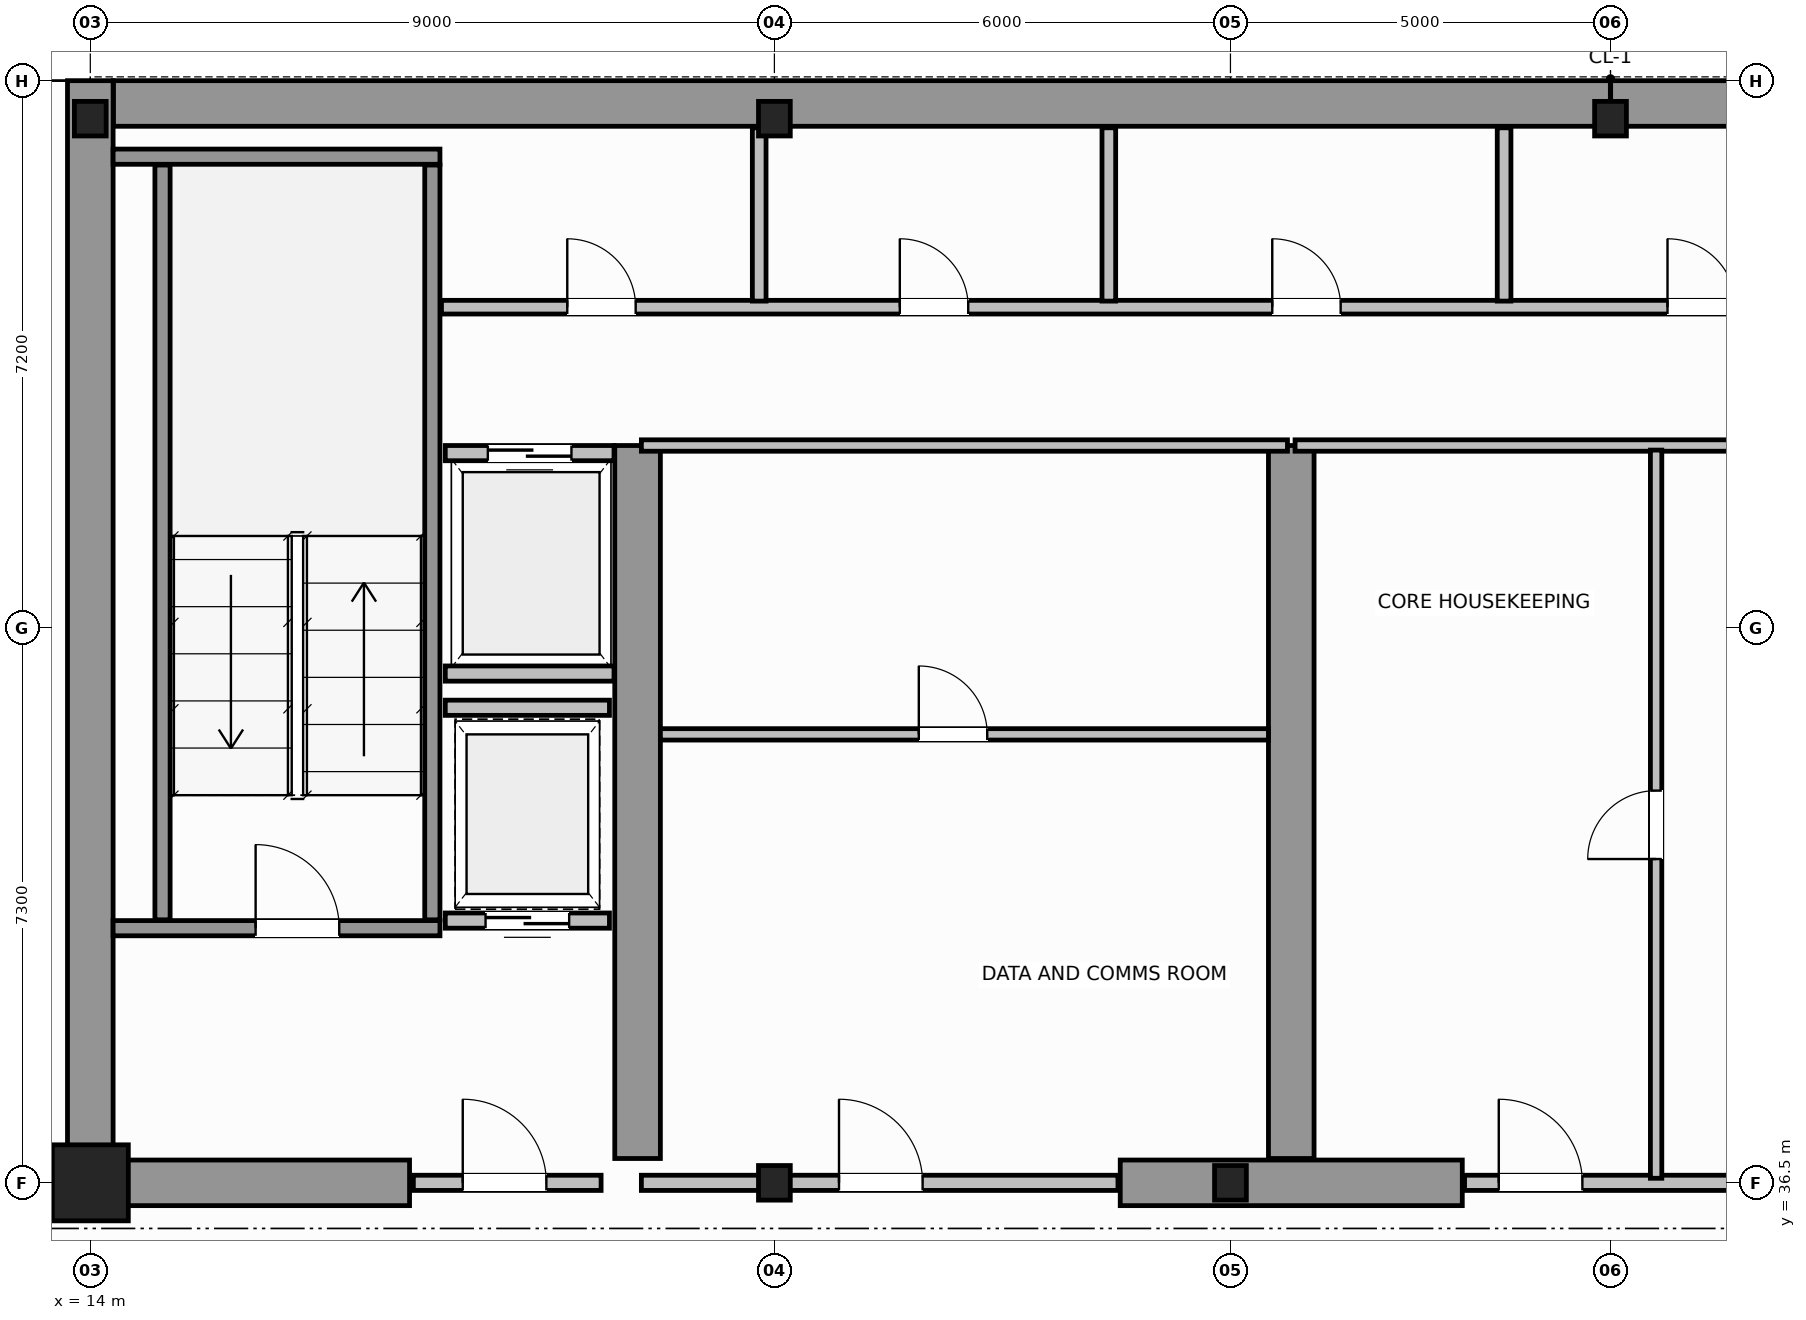
"""IFC4 building model, lengths in metres.
Left out: names, types, materials, properties, quantities, classifications, styles, units other than length and angle.
Written with IfcOpenShell. Run it as: python <this file> out.ifc"""

import sys

from ifc_helpers import new_model, si_unit, direction, frame, frame_2d, origin, origin_2d, place, context, subcontext, project, spatial, rectangle, i_section, extrude, source, transform, mapped, element, fill, save


model = new_model("IFC4")
c1 = context("Model", 3, precision=1e-05, world=origin(), true_north=direction((0.0, 1.0)))
c2 = subcontext(c1, "Body", "Model", "MODEL_VIEW")
j1 = project(units=[si_unit("LENGTHUNIT", "METRE"), si_unit("PLANEANGLEUNIT", "RADIAN")], contexts=[c1])
p1 = place(None, origin())
s1 = spatial("IfcSite", under=j1, at=p1, CompositionType="ELEMENT")
p2 = place(p1, origin())
s2 = spatial("IfcBuilding", under=s1, at=p2, CompositionType="ELEMENT")
p3 = place(p2, frame((0.0, 0.0, 234.6)))
s3 = spatial("IfcBuildingStorey", under=s2, at=p3, CompositionType="ELEMENT", Elevation=234.6)
m1 = source(origin(), c2, "Body", "SweptSolid", [
    extrude(rectangle(XDim=1.0, YDim=1.0, at=origin_2d()), origin(), (0.0, 0.0, 1.0), 3.8),
])
p4 = place(p3, frame((14.0, 36.5, 0.0), z_axis=(0.0, 0.0, 1.0), x_axis=(1.0, 0.0, 0.0)))
e1 = element("IfcColumn", 1, at=p4, inside=s3, PredefinedType="COLUMN", context=c2, shape_type="MappedRepresentation", body=[
    mapped(m1, transform((0.0, 0.0, 0.0), scale=1.0)),
])
m2 = source(origin(), c2, "Body", "SweptSolid", [
    extrude(i_section(OverallWidth=0.418, OverallDepth=0.455, WebThickness=0.042, FlangeThickness=0.058, FilletRadius=0.015, at=origin_2d()), origin(), (0.0, 0.0, 1.0), 3.8),
])
for number, where, z_axis, x_axis in (
    (2, (23.0, 36.5, 0.0), (0.0, 0.0, 1.0), (1.0, 0.0, 0.0)),
    (3, (29.0, 36.5, 0.0), (0.0, 0.0, 1.0), (1.0, 0.0, 0.0)),
    (4, (14.0, 50.5, 0.0), (0.0, 0.0, 1.0), (1.0, 0.0, 0.0)),
    (5, (23.0, 50.5, 0.0), (0.0, 0.0, 1.0), (1.0, 0.0, 0.0)),
    (6, (34.0, 50.5, 0.0), (0.0, 0.0, 1.0), (1.0, 0.0, 0.0)),
):
    element("IfcColumn", number, at=place(p3, frame(where, z_axis=z_axis, x_axis=x_axis)), inside=s3, PredefinedType="COLUMN", context=c2, shape_type="MappedRepresentation", body=[
        mapped(m2, transform((0.0, 0.0, 0.0), scale=1.0)),
    ])
for number, where, z_axis, x_axis in (
    (7, (14.304, 50.7, 0.0), (0.0, 0.0, 1.0), (1.0, 0.0, 0.0)),
    (8, (34.002, 50.7, 0.0), (0.0, 0.0, 1.0), (1.0, 0.0, 0.0)),
):
    element("IfcWall", number, at=place(p3, frame(where, z_axis=z_axis, x_axis=x_axis)), inside=s3, PredefinedType="SHEAR", context=c2, shape_type="SweptSolid", body=[
        extrude(rectangle(XDim=19.694, YDim=0.6, at=frame_2d((9.847, 0.0))), origin(), (0.0, 0.0, 1.0), 3.8),
    ])
p5 = place(p3, frame((14.0, 36.5, 0.0), z_axis=(0.0, 0.0, 1.0), x_axis=(0.0, 1.0, 0.0)))
e9 = element("IfcWall", 9, at=p5, inside=s3, PredefinedType="SHEAR", context=c2, shape_type="SweptSolid", body=[
    extrude(rectangle(XDim=14.5, YDim=0.6, at=frame_2d((7.25, 0.0))), origin(), (0.0, 0.0, 1.0), 3.8),
])
p6 = place(p3, frame((14.32, 36.5, 0.0), z_axis=(0.0, 0.0, 1.0), x_axis=(1.0, 0.0, 0.0)))
e10 = element("IfcWall", 10, at=p6, inside=s3, PredefinedType="SHEAR", context=c2, shape_type="SweptSolid", body=[
    extrude(rectangle(XDim=3.88, YDim=0.6, at=frame_2d((1.94, 0.0))), origin(), (0.0, 0.0, 1.0), 2.58),
])
p7 = place(p3, frame((27.55, 36.5, 0.0), z_axis=(0.0, 0.0, 1.0), x_axis=(1.0, 0.0, 0.0)))
e11 = element("IfcWall", 11, at=p7, inside=s3, PredefinedType="SHEAR", context=c2, shape_type="SweptSolid", body=[
    extrude(rectangle(XDim=4.5, YDim=0.6, at=frame_2d((2.25, 0.0))), origin(), (0.0, 0.0, 1.0), 3.8),
])
for number, where, z_axis, x_axis in (
    (12, (21.2, 36.82, 0.0), (0.0, 0.0, 1.0), (0.0, 1.0, 0.0)),
    (13, (29.8, 36.82, 0.0), (0.0, 0.0, 1.0), (0.0, 1.0, 0.0)),
):
    element("IfcWall", number, at=place(p3, frame(where, z_axis=z_axis, x_axis=x_axis)), inside=s3, PredefinedType="SHEAR", context=c2, shape_type="SweptSolid", body=[
        extrude(rectangle(XDim=9.38, YDim=0.6, at=frame_2d((4.69, 0.0))), origin(), (0.0, 0.0, 1.0), 3.8),
    ])
p8 = place(p3, frame((14.3, 39.85, 0.0), z_axis=(0.0, 0.0, 1.0), x_axis=(1.0, 0.0, 0.0)))
e14 = element("IfcWall", 14, at=p8, inside=s3, PredefinedType="SOLIDWALL", context=c2, shape_type="SweptSolid", body=[
    extrude(rectangle(XDim=4.3, YDim=0.2, at=frame_2d((2.15, 0.0))), origin(), (0.0, 0.0, 1.0), 3.8),
])
p9 = place(p8, frame((1.875, 0.0, 0.0)))
e15 = element("IfcOpeningElement", 15, at=p9, cuts=e14, PredefinedType="OPENING", context=c2, shape_type="SweptSolid", body=[
    extrude(rectangle(XDim=1.1, YDim=2.15, at=frame_2d((0.55, 1.075))), frame((0.0, 0.11, 0.0), z_axis=(0.0, -1.0, 0.0), x_axis=(1.0, 0.0, 0.0)), (0.0, 0.0, 1.0), 0.22),
])
p10 = place(p3, frame((14.3, 50.0, 0.0), z_axis=(0.0, 0.0, 1.0), x_axis=(1.0, 0.0, 0.0)))
e16 = element("IfcWall", 16, at=p10, inside=s3, PredefinedType="SOLIDWALL", context=c2, shape_type="SweptSolid", body=[
    extrude(rectangle(XDim=4.3, YDim=0.2, at=frame_2d((2.15, 0.0))), origin(), (0.0, 0.0, 1.0), 3.8),
])
for number, where, z_axis, x_axis in (
    (17, (14.95, 39.96, 0.0), (0.0, 0.0, 1.0), (0.0, 1.0, 0.0)),
    (18, (18.5, 39.96, 0.0), (0.0, 0.0, 1.0), (0.0, 1.0, 0.0)),
):
    element("IfcWall", number, at=place(p3, frame(where, z_axis=z_axis, x_axis=x_axis)), inside=s3, PredefinedType="SOLIDWALL", context=c2, shape_type="SweptSolid", body=[
        extrude(rectangle(XDim=9.93, YDim=0.2, at=frame_2d((4.965, 0.0))), origin(), (0.0, 0.0, 1.0), 3.8),
    ])
p11 = place(p3, frame((18.25, 36.5, 0.0), z_axis=(0.0, 0.0, 1.0), x_axis=(1.0, 0.0, 0.0)))
e19 = element("IfcWall", 19, at=p11, inside=s3, PredefinedType="SOLIDWALL", context=c2, shape_type="SweptSolid", body=[
    extrude(rectangle(XDim=2.47, YDim=0.2, at=frame_2d((1.235, 0.0))), origin(), (0.0, 0.0, 1.0), 2.57),
])
p12 = place(p11, frame((0.65, 0.0, 0.0)))
e20 = element("IfcOpeningElement", 20, at=p12, cuts=e19, PredefinedType="OPENING", context=c2, shape_type="SweptSolid", body=[
    extrude(rectangle(XDim=1.1, YDim=2.15, at=frame_2d((0.55, 1.075))), frame((0.0, 0.11, 0.0), z_axis=(0.0, -1.0, 0.0), x_axis=(1.0, 0.0, 0.0)), (0.0, 0.0, 1.0), 0.22),
])
p13 = place(p3, frame((18.67, 46.1, 0.0), z_axis=(0.0, 0.0, 1.0), x_axis=(1.0, 0.0, 0.0)))
e21 = element("IfcWall", 21, at=p13, inside=s3, PredefinedType="SOLIDWALL", context=c2, shape_type="SweptSolid", body=[
    extrude(rectangle(XDim=2.22, YDim=0.2, at=frame_2d((1.11, 0.0))), origin(), (0.0, 0.0, 1.0), 3.58),
])
p14 = place(p13, frame((0.56, 0.0, 0.0)))
e22 = element("IfcOpeningElement", 22, at=p14, cuts=e21, PredefinedType="OPENING", context=c2, shape_type="SweptSolid", body=[
    extrude(rectangle(XDim=1.1, YDim=2.15, at=frame_2d((0.55, 1.075))), frame((0.0, 0.11, 0.0), z_axis=(0.0, -1.0, 0.0), x_axis=(1.0, 0.0, 0.0)), (0.0, 0.0, 1.0), 0.22),
])
p15 = place(p3, frame((18.67, 43.2, 0.0), z_axis=(0.0, 0.0, 1.0), x_axis=(1.0, 0.0, 0.0)))
e23 = element("IfcWall", 23, at=p15, inside=s3, PredefinedType="SOLIDWALL", context=c2, shape_type="SweptSolid", body=[
    extrude(rectangle(XDim=2.22, YDim=0.2, at=frame_2d((1.11, 0.0))), origin(), (0.0, 0.0, 1.0), 3.58),
])
p16 = place(p3, frame((18.67, 39.95, 0.0), z_axis=(0.0, 0.0, 1.0), x_axis=(1.0, 0.0, 0.0)))
e24 = element("IfcWall", 24, at=p16, inside=s3, PredefinedType="SOLIDWALL", context=c2, shape_type="SweptSolid", body=[
    extrude(rectangle(XDim=2.16, YDim=0.2, at=frame_2d((1.08, 0.0))), origin(), (0.0, 0.0, 1.0), 3.58),
])
p17 = place(p16, frame((0.53, 0.0, 0.0)))
e25 = element("IfcOpeningElement", 25, at=p17, cuts=e24, PredefinedType="OPENING", context=c2, shape_type="SweptSolid", body=[
    extrude(rectangle(XDim=1.1, YDim=2.15, at=frame_2d((0.55, 1.075))), frame((0.0, 0.11, 0.0), z_axis=(0.0, -1.0, 0.0), x_axis=(1.0, 0.0, 0.0)), (0.0, 0.0, 1.0), 0.22),
])
p18 = place(p3, frame((18.67, 42.75, 0.0), z_axis=(0.0, 0.0, 1.0), x_axis=(1.0, 0.0, 0.0)))
e26 = element("IfcWall", 26, at=p18, inside=s3, PredefinedType="SOLIDWALL", context=c2, shape_type="SweptSolid", body=[
    extrude(rectangle(XDim=2.16, YDim=0.2, at=frame_2d((1.08, 0.0))), origin(), (0.0, 0.0, 1.0), 3.58),
])
p19 = place(p3, frame((21.25, 36.5, 0.0), z_axis=(0.0, 0.0, 1.0), x_axis=(1.0, 0.0, 0.0)))
e27 = element("IfcWall", 27, at=p19, inside=s3, PredefinedType="SOLIDWALL", context=c2, shape_type="SweptSolid", body=[
    extrude(rectangle(XDim=6.27, YDim=0.2, at=frame_2d((3.135, 0.0))), origin(), (0.0, 0.0, 1.0), 2.37),
])
p20 = place(p19, frame((2.6, 0.0, 0.0)))
e28 = element("IfcOpeningElement", 28, at=p20, cuts=e27, PredefinedType="OPENING", context=c2, shape_type="SweptSolid", body=[
    extrude(rectangle(XDim=1.1, YDim=2.15, at=frame_2d((0.55, 1.075))), frame((0.0, 0.11, 0.0), z_axis=(0.0, -1.0, 0.0), x_axis=(1.0, 0.0, 0.0)), (0.0, 0.0, 1.0), 0.22),
])
p21 = place(p3, frame((21.25, 46.2, 0.0), z_axis=(0.0, 0.0, 1.0), x_axis=(1.0, 0.0, 0.0)))
e29 = element("IfcWall", 29, at=p21, inside=s3, PredefinedType="PARTITIONING", context=c2, shape_type="SweptSolid", body=[
    extrude(rectangle(XDim=8.5, YDim=0.15, at=frame_2d((4.25, 0.0))), origin(), (0.0, 0.0, 1.0), 3.58),
])
p22 = place(p3, frame((21.5, 42.4, 0.0), z_axis=(0.0, 0.0, 1.0), x_axis=(1.0, 0.0, 0.0)))
e30 = element("IfcWall", 30, at=p22, inside=s3, PredefinedType="PARTITIONING", context=c2, shape_type="SweptSolid", body=[
    extrude(rectangle(XDim=8.0, YDim=0.15, at=frame_2d((4.0, 0.0))), origin(), (0.0, 0.0, 1.0), 3.58),
])
p23 = place(p22, frame((3.4, 0.0, 0.0)))
e31 = element("IfcOpeningElement", 31, at=p23, cuts=e30, PredefinedType="OPENING", context=c2, shape_type="SweptSolid", body=[
    extrude(rectangle(XDim=0.9, YDim=2.1, at=frame_2d((0.45, 1.05))), frame((0.0, 0.085, 0.0), z_axis=(0.0, -1.0, 0.0), x_axis=(1.0, 0.0, 0.0)), (0.0, 0.0, 1.0), 0.17),
])
p24 = place(p3, frame((32.08, 36.5, 0.0), z_axis=(0.0, 0.0, 1.0), x_axis=(1.0, 0.0, 0.0)))
e32 = element("IfcWall", 32, at=p24, inside=s3, PredefinedType="SOLIDWALL", context=c2, shape_type="SweptSolid", body=[
    extrude(rectangle(XDim=4.04, YDim=0.2, at=frame_2d((2.02, 0.0))), origin(), (0.0, 0.0, 1.0), 2.37),
])
p25 = place(p24, frame((0.45, 0.0, 0.0)))
e33 = element("IfcOpeningElement", 33, at=p25, cuts=e32, PredefinedType="OPENING", context=c2, shape_type="SweptSolid", body=[
    extrude(rectangle(XDim=1.1, YDim=2.15, at=frame_2d((0.55, 1.075))), frame((0.0, 0.11, 0.0), z_axis=(0.0, -1.0, 0.0), x_axis=(1.0, 0.0, 0.0)), (0.0, 0.0, 1.0), 0.22),
])
p26 = place(p3, frame((29.85, 46.2, 0.0), z_axis=(0.0, 0.0, 1.0), x_axis=(1.0, 0.0, 0.0)))
e34 = element("IfcWall", 34, at=p26, inside=s3, PredefinedType="PARTITIONING", context=c2, shape_type="SweptSolid", body=[
    extrude(rectangle(XDim=8.5, YDim=0.15, at=frame_2d((4.25, 0.0))), origin(), (0.0, 0.0, 1.0), 3.58),
])
p27 = place(p3, frame((34.6, 36.56, 0.0), z_axis=(0.0, 0.0, 1.0), x_axis=(0.0, 1.0, 0.0)))
e35 = element("IfcWall", 35, at=p27, inside=s3, PredefinedType="PARTITIONING", context=c2, shape_type="SweptSolid", body=[
    extrude(rectangle(XDim=9.58, YDim=0.15, at=frame_2d((4.79, 0.0))), origin(), (0.0, 0.0, 1.0), 3.58),
])
p28 = place(p27, frame((4.2, 0.0, 0.0)))
e36 = element("IfcOpeningElement", 36, at=p28, cuts=e35, PredefinedType="OPENING", context=c2, shape_type="SweptSolid", body=[
    extrude(rectangle(XDim=0.9, YDim=2.1, at=frame_2d((0.45, 1.05))), frame((0.0, 0.085, 0.0), z_axis=(0.0, -1.0, 0.0), x_axis=(1.0, 0.0, 0.0)), (0.0, 0.0, 1.0), 0.17),
])
p29 = place(p3, frame((18.62, 48.02, 0.0), z_axis=(0.0, 0.0, 1.0), x_axis=(1.0, 0.0, 0.0)))
e37 = element("IfcWall", 37, at=p29, inside=s3, PredefinedType="PLUMBINGWALL", context=c2, shape_type="SweptSolid", body=[
    extrude(rectangle(XDim=30.76, YDim=0.18, at=frame_2d((15.38, 0.0))), origin(), (0.0, 0.0, 1.0), 3.58),
])
p30 = place(p29, frame((1.655, 0.0, 0.0)))
e38 = element("IfcOpeningElement", 38, at=p30, cuts=e37, PredefinedType="OPENING", context=c2, shape_type="SweptSolid", body=[
    extrude(rectangle(XDim=0.9, YDim=2.15, at=frame_2d((0.45, 1.075))), frame((0.0, 0.1, 0.0), z_axis=(0.0, -1.0, 0.0), x_axis=(1.0, 0.0, 0.0)), (0.0, 0.0, 1.0), 0.2),
])
p31 = place(p29, frame((6.03, 0.0, 0.0)))
e39 = element("IfcOpeningElement", 39, at=p31, cuts=e37, PredefinedType="OPENING", context=c2, shape_type="SweptSolid", body=[
    extrude(rectangle(XDim=0.9, YDim=2.15, at=frame_2d((0.45, 1.075))), frame((0.0, 0.1, 0.0), z_axis=(0.0, -1.0, 0.0), x_axis=(1.0, 0.0, 0.0)), (0.0, 0.0, 1.0), 0.2),
])
p32 = place(p29, frame((10.93, 0.0, 0.0)))
e40 = element("IfcOpeningElement", 40, at=p32, cuts=e37, PredefinedType="OPENING", context=c2, shape_type="SweptSolid", body=[
    extrude(rectangle(XDim=0.9, YDim=2.15, at=frame_2d((0.45, 1.075))), frame((0.0, 0.1, 0.0), z_axis=(0.0, -1.0, 0.0), x_axis=(1.0, 0.0, 0.0)), (0.0, 0.0, 1.0), 0.2),
])
p33 = place(p29, frame((16.13, 0.0, 0.0)))
e41 = element("IfcOpeningElement", 41, at=p33, cuts=e37, PredefinedType="OPENING", context=c2, shape_type="SweptSolid", body=[
    extrude(rectangle(XDim=0.9, YDim=2.15, at=frame_2d((0.45, 1.075))), frame((0.0, 0.1, 0.0), z_axis=(0.0, -1.0, 0.0), x_axis=(1.0, 0.0, 0.0)), (0.0, 0.0, 1.0), 0.2),
])
p34 = place(p29, frame((21.73, 0.0, 0.0)))
e42 = element("IfcOpeningElement", 42, at=p34, cuts=e37, PredefinedType="OPENING", context=c2, shape_type="SweptSolid", body=[
    extrude(rectangle(XDim=0.9, YDim=2.15, at=frame_2d((0.45, 1.075))), frame((0.0, 0.1, 0.0), z_axis=(0.0, -1.0, 0.0), x_axis=(1.0, 0.0, 0.0)), (0.0, 0.0, 1.0), 0.2),
])
p35 = place(p29, frame((27.505, 0.0, 0.0)))
e43 = element("IfcOpeningElement", 43, at=p35, cuts=e37, PredefinedType="OPENING", context=c2, shape_type="SweptSolid", body=[
    extrude(rectangle(XDim=0.9, YDim=2.15, at=frame_2d((0.45, 1.075))), frame((0.0, 0.1, 0.0), z_axis=(0.0, -1.0, 0.0), x_axis=(1.0, 0.0, 0.0)), (0.0, 0.0, 1.0), 0.2),
])
p36 = place(p3, frame((22.8, 48.1, 0.0), z_axis=(0.0, 0.0, 1.0), x_axis=(0.0, 1.0, 0.0)))
e44 = element("IfcWall", 44, at=p36, inside=s3, PredefinedType="PLUMBINGWALL", context=c2, shape_type="SweptSolid", body=[
    extrude(rectangle(XDim=2.28, YDim=0.18, at=frame_2d((1.14, 0.0))), origin(), (0.0, 0.0, 1.0), 2.37),
])
for number, where, z_axis, x_axis in (
    (45, (27.4, 48.1, 0.0), (0.0, 0.0, 1.0), (0.0, 1.0, 0.0)),
    (46, (32.6, 48.1, 0.0), (0.0, 0.0, 1.0), (0.0, 1.0, 0.0)),
):
    element("IfcWall", number, at=place(p3, frame(where, z_axis=z_axis, x_axis=x_axis)), inside=s3, PredefinedType="PLUMBINGWALL", context=c2, shape_type="SweptSolid", body=[
        extrude(rectangle(XDim=2.28, YDim=0.18, at=frame_2d((1.14, 0.0))), origin(), (0.0, 0.0, 1.0), 3.58),
    ])
p37 = place(p3, frame((7.306, 36.48, 0.0), z_axis=(0.0, 0.0, 1.0), x_axis=(1.0, 0.0, 0.0)))
e47 = element("IfcWall", 47, at=p37, inside=s3, PredefinedType="PARTITIONING", context=c2, shape_type="SweptSolid", body=[
    extrude(rectangle(XDim=6.634, YDim=0.12, at=frame_2d((3.317, 0.0))), origin(), (0.0, 0.0, 1.0), 2.37),
])
p38 = place(p37, frame((2.867, 0.0, 0.0)))
e48 = element("IfcOpeningElement", 48, at=p38, cuts=e47, PredefinedType="OPENING", context=c2, shape_type="SweptSolid", body=[
    extrude(rectangle(XDim=0.9, YDim=2.15, at=frame_2d((0.45, 1.075))), frame((0.0, 0.07, 0.0), z_axis=(0.0, -1.0, 0.0), x_axis=(1.0, 0.0, 0.0)), (0.0, 0.0, 1.0), 0.14),
])
m3 = source(origin(), c2, "Body", "SweptSolid", [
    extrude(rectangle(XDim=1.1, YDim=2.15, at=frame_2d((0.55, 1.075))), frame((0.0, 0.025, 0.0), z_axis=(0.0, -1.0, 0.0), x_axis=(1.0, 0.0, 0.0)), (0.0, 0.0, 1.0), 0.05),
])
p39 = place(p9, origin())
e49 = element("IfcDoor", 49, at=p39, inside=s3, OperationType="SINGLE_SWING_LEFT", PredefinedType="DOOR", context=c2, shape_type="MappedRepresentation", body=[
    mapped(m3, transform((0.0, 0.0, 0.0), scale=1.0)),
])
fill(e15, e49)
p40 = place(p12, origin())
e50 = element("IfcDoor", 50, at=p40, inside=s3, OperationType="SINGLE_SWING_RIGHT", PredefinedType="DOOR", context=c2, shape_type="MappedRepresentation", body=[
    mapped(m3, transform((0.0, 0.0, 0.0), scale=1.0)),
])
fill(e20, e50)
p41 = place(p14, origin())
e51 = element("IfcDoor", 51, at=p41, inside=s3, OperationType="DOUBLE_DOOR_SLIDING", PredefinedType="DOOR", context=c2, shape_type="MappedRepresentation", body=[
    mapped(m3, transform((0.0, 0.0, 0.0), scale=1.0)),
])
fill(e22, e51)
p42 = place(p17, origin())
e52 = element("IfcDoor", 52, at=p42, inside=s3, OperationType="DOUBLE_DOOR_SLIDING", PredefinedType="DOOR", context=c2, shape_type="MappedRepresentation", body=[
    mapped(m3, transform((0.0, 0.0, 0.0), scale=1.0)),
])
fill(e25, e52)
p43 = place(p20, origin())
e53 = element("IfcDoor", 53, at=p43, inside=s3, OperationType="SINGLE_SWING_LEFT", PredefinedType="DOOR", context=c2, shape_type="MappedRepresentation", body=[
    mapped(m3, transform((0.0, 0.0, 0.0), scale=1.0)),
])
fill(e28, e53)
m4 = source(origin(), c2, "Body", "SweptSolid", [
    extrude(rectangle(XDim=0.9, YDim=2.1, at=frame_2d((0.45, 1.05))), frame((0.0, 0.025, 0.0), z_axis=(0.0, -1.0, 0.0), x_axis=(1.0, 0.0, 0.0)), (0.0, 0.0, 1.0), 0.05),
])
p44 = place(p23, origin())
e54 = element("IfcDoor", 54, at=p44, inside=s3, OperationType="SINGLE_SWING_RIGHT", PredefinedType="DOOR", context=c2, shape_type="MappedRepresentation", body=[
    mapped(m4, transform((0.0, 0.0, 0.0), scale=1.0)),
])
fill(e31, e54)
p45 = place(p25, origin())
e55 = element("IfcDoor", 55, at=p45, inside=s3, OperationType="SINGLE_SWING_LEFT", PredefinedType="DOOR", context=c2, shape_type="MappedRepresentation", body=[
    mapped(m3, transform((0.0, 0.0, 0.0), scale=1.0)),
])
fill(e33, e55)
p46 = place(p28, origin())
e56 = element("IfcDoor", 56, at=p46, inside=s3, OperationType="SINGLE_SWING_RIGHT", PredefinedType="DOOR", context=c2, shape_type="MappedRepresentation", body=[
    mapped(m4, transform((0.0, 0.0, 0.0), scale=1.0)),
])
fill(e36, e56)
m5 = source(origin(), c2, "Body", "SweptSolid", [
    extrude(rectangle(XDim=0.9, YDim=2.15, at=frame_2d((0.45, 1.075))), frame((0.0, 0.025, 0.0), z_axis=(0.0, -1.0, 0.0), x_axis=(1.0, 0.0, 0.0)), (0.0, 0.0, 1.0), 0.05),
])
p47 = place(p30, origin())
e57 = element("IfcDoor", 57, at=p47, inside=s3, OperationType="SINGLE_SWING_LEFT", PredefinedType="DOOR", context=c2, shape_type="MappedRepresentation", body=[
    mapped(m5, transform((0.0, 0.0, 0.0), scale=1.0)),
])
fill(e38, e57)
p48 = place(p31, origin())
e58 = element("IfcDoor", 58, at=p48, inside=s3, OperationType="SINGLE_SWING_RIGHT", PredefinedType="DOOR", context=c2, shape_type="MappedRepresentation", body=[
    mapped(m5, transform((0.0, 0.0, 0.0), scale=1.0)),
])
fill(e39, e58)
p49 = place(p32, origin())
e59 = element("IfcDoor", 59, at=p49, inside=s3, OperationType="SINGLE_SWING_LEFT", PredefinedType="DOOR", context=c2, shape_type="MappedRepresentation", body=[
    mapped(m5, transform((0.0, 0.0, 0.0), scale=1.0)),
])
fill(e40, e59)
p50 = place(p33, origin())
e60 = element("IfcDoor", 60, at=p50, inside=s3, OperationType="SINGLE_SWING_RIGHT", PredefinedType="DOOR", context=c2, shape_type="MappedRepresentation", body=[
    mapped(m5, transform((0.0, 0.0, 0.0), scale=1.0)),
])
fill(e41, e60)
save(model, sys.argv[1])
